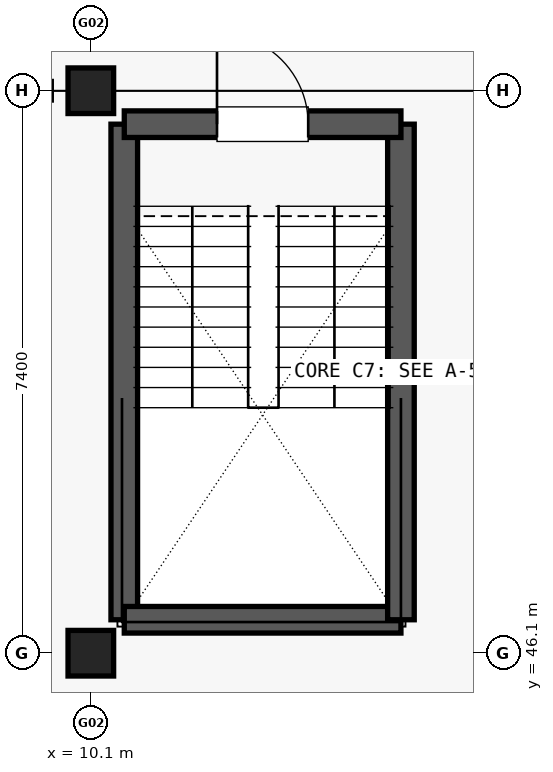
"""IFC4 building model, lengths in metres.
Left out: names, types, materials, properties, quantities, classifications, styles, units other than length and angle.
Written with IfcOpenShell. Run it as: python <this file> out.ifc"""

import sys

from ifc_helpers import new_model, si_unit, direction, frame, frame_2d, origin, origin_2d, place, context, subcontext, project, spatial, rectangle, extrude, element, fill, save


model = new_model("IFC4")
c1 = context("Model", 3, precision=1e-05, world=origin(), true_north=direction((0.0, 1.0)))
c2 = subcontext(c1, "Body", "Model", "MODEL_VIEW")
j1 = project(units=[si_unit("LENGTHUNIT", "METRE"), si_unit("PLANEANGLEUNIT", "RADIAN")], contexts=[c1])
p1 = place(None, origin())
s1 = spatial("IfcSite", under=j1, at=p1, CompositionType="ELEMENT")
p2 = place(p1, origin())
s2 = spatial("IfcBuilding", under=s1, at=p2, CompositionType="ELEMENT")
p3 = place(p2, frame((0.0, 0.0, 10.2)))
s3 = spatial("IfcBuildingStorey", under=s2, at=p3, CompositionType="ELEMENT", Elevation=10.2)
for number, where, z_axis, x_axis in (
    (1, (10.1, 46.1, 0.0), (0.0, 0.0, 1.0), (1.0, 0.0, 0.0)),
    (2, (10.1, 53.5, 0.0), (0.0, 0.0, 1.0), (1.0, 0.0, 0.0)),
):
    element("IfcColumn", number, at=place(p3, frame(where, z_axis=z_axis, x_axis=x_axis)), inside=s3, PredefinedType="COLUMN", context=c2, shape_type="SweptSolid", body=[
        extrude(rectangle(XDim=0.6, YDim=0.6, at=origin_2d()), origin(), (0.0, 0.0, 1.0), 3.37),
    ])
p4 = place(p3, frame((10.54, 46.54, 0.0), z_axis=(0.0, 0.0, 1.0), x_axis=(0.0, 1.0, 0.0)))
e3 = element("IfcWall", 3, at=p4, inside=s3, PredefinedType="SHEAR", context=c2, shape_type="SweptSolid", body=[
    extrude(rectangle(XDim=6.52, YDim=0.35, at=frame_2d((3.26, 0.0))), origin(), (0.0, 0.0, 1.0), 3.365),
])
p5 = place(p3, frame((10.54, 46.54, 0.0), z_axis=(0.0, 0.0, 1.0), x_axis=(1.0, 0.0, 0.0)))
e4 = element("IfcWall", 4, at=p5, inside=s3, PredefinedType="SHEAR", context=c2, shape_type="SweptSolid", body=[
    extrude(rectangle(XDim=3.64, YDim=0.35, at=frame_2d((1.82, 0.0))), origin(), (0.0, 0.0, 1.0), 3.365),
])
p6 = place(p3, frame((14.18, 46.54, 0.0), z_axis=(0.0, 0.0, 1.0), x_axis=(0.0, 1.0, 0.0)))
e5 = element("IfcWall", 5, at=p6, inside=s3, PredefinedType="SHEAR", context=c2, shape_type="SweptSolid", body=[
    extrude(rectangle(XDim=6.52, YDim=0.35, at=frame_2d((3.26, 0.0))), origin(), (0.0, 0.0, 1.0), 3.365),
])
p7 = place(p3, frame((10.54, 53.06, 0.0), z_axis=(0.0, 0.0, 1.0), x_axis=(1.0, 0.0, 0.0)))
e6 = element("IfcWall", 6, at=p7, inside=s3, PredefinedType="SHEAR", context=c2, shape_type="SweptSolid", body=[
    extrude(rectangle(XDim=3.64, YDim=0.35, at=frame_2d((1.82, 0.0))), origin(), (0.0, 0.0, 1.0), 3.365),
])
p8 = place(p7, frame((1.22, 0.0, 0.0)))
e7 = element("IfcOpeningElement", 7, at=p8, cuts=e6, PredefinedType="OPENING", context=c2, shape_type="SweptSolid", body=[
    extrude(rectangle(XDim=1.2, YDim=2.15, at=frame_2d((0.6, 1.075))), frame((0.0, 0.185, 0.0), z_axis=(0.0, -1.0, 0.0), x_axis=(1.0, 0.0, 0.0)), (0.0, 0.0, 1.0), 0.37),
])
p9 = place(p8, origin())
e8 = element("IfcDoor", 8, at=p9, inside=s3, OperationType="SINGLE_SWING_LEFT", PredefinedType="DOOR", context=c2, shape_type="SweptSolid", body=[
    extrude(rectangle(XDim=1.2, YDim=2.15, at=frame_2d((0.6, 1.075))), frame((0.0, 0.025, 0.0), z_axis=(0.0, -1.0, 0.0), x_axis=(1.0, 0.0, 0.0)), (0.0, 0.0, 1.0), 0.05),
])
fill(e7, e8)
save(model, sys.argv[1])
